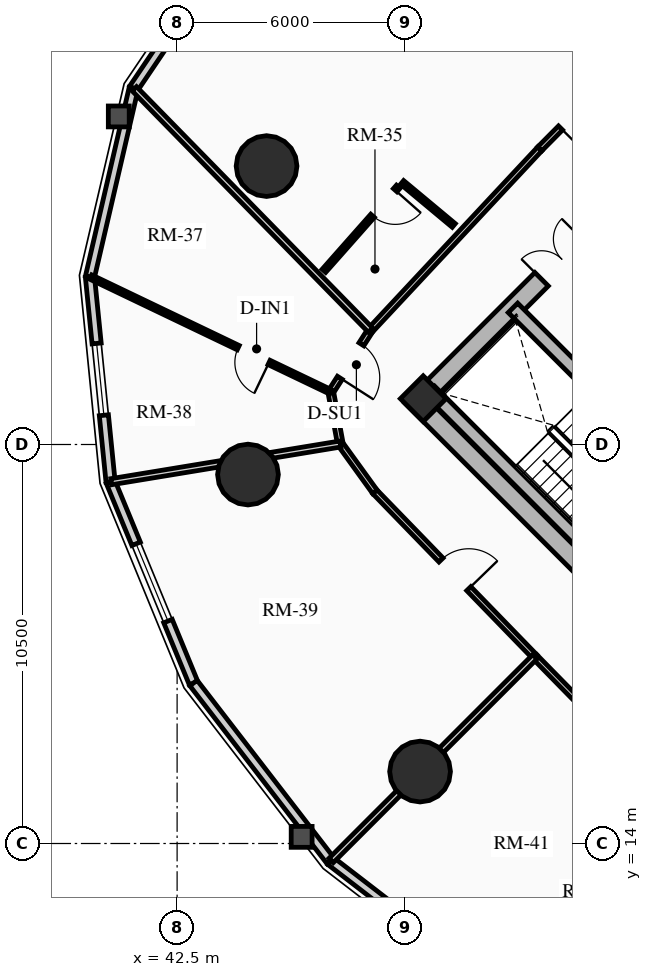
"""IFC4 building model, lengths in metres.
Left out: names, types, materials, properties, quantities, classifications, styles, units other than length and angle.
Written with IfcOpenShell. Run it as: python <this file> out.ifc"""

import sys

from ifc_helpers import new_model, si_unit, direction, frame, frame_2d, origin, origin_2d, place, context, subcontext, project, spatial, rectangle, circle, extrude, source, transform, mapped, element, fill, save


model = new_model("IFC4")
c1 = context("Model", 3, precision=1e-05, world=origin(), true_north=direction((0.0, 1.0)))
c2 = subcontext(c1, "Body", "Model", "MODEL_VIEW")
j1 = project(units=[si_unit("LENGTHUNIT", "METRE"), si_unit("PLANEANGLEUNIT", "RADIAN")], contexts=[c1])
p1 = place(None, origin())
s1 = spatial("IfcSite", under=j1, at=p1, CompositionType="ELEMENT")
p2 = place(p1, origin())
s2 = spatial("IfcBuilding", under=s1, at=p2, CompositionType="ELEMENT")
p3 = place(p2, frame((0.0, 0.0, 36.55)))
s3 = spatial("IfcBuildingStorey", under=s2, at=p3, CompositionType="ELEMENT", Elevation=36.55)
p4 = place(p3, frame((58.773, 15.661, 0.0), z_axis=(0.0, 0.0, 1.0), x_axis=(-0.707106781187, 0.707106781187, 0.0)))
e1 = element("IfcWall", 1, at=p4, inside=s3, PredefinedType="SHEAR", context=c2, shape_type="SweptSolid", body=[
    extrude(rectangle(XDim=14.3, YDim=0.5, at=frame_2d((7.15, 0.0))), origin(), (0.0, 0.0, 1.0), 2.91),
])
p5 = place(p3, frame((48.838, 25.596, 0.0), z_axis=(0.0, 0.0, 1.0), x_axis=(0.707106781187, 0.707106781187, 0.0)))
e2 = element("IfcWall", 2, at=p5, inside=s3, PredefinedType="SHEAR", context=c2, shape_type="SweptSolid", body=[
    extrude(rectangle(XDim=10.7, YDim=0.5, at=frame_2d((5.35, 0.0))), origin(), (0.0, 0.0, 1.0), 2.91),
])
m1 = source(origin(), c2, "Body", "SweptSolid", [
    extrude(rectangle(XDim=1.5, YDim=2.02, at=frame_2d((0.75, 1.01))), frame((0.0, 0.26, 0.0), z_axis=(0.0, -1.0, 0.0), x_axis=(1.0, 0.0, 0.0)), (0.0, 0.0, 1.0), 0.52),
])
p6 = place(p5, frame((4.6, 0.0, 0.0)))
e3 = element("IfcOpeningElement", 3, at=p6, cuts=e2, PredefinedType="OPENING", context=c2, shape_type="MappedRepresentation", body=[
    mapped(m1, transform((0.0, 0.0, 0.0), x_axis=(1.0, 0.0, 0.0), y_axis=(0.0, 1.0, 0.0), z_axis=(0.0, 0.0, 1.0), scale=1.0)),
])
p7 = place(p3, frame((61.096, 18.338, 0.0), z_axis=(0.0, 0.0, 1.0), x_axis=(-0.707106781187, 0.707106781187, 0.0)))
e4 = element("IfcWall", 4, at=p7, inside=s3, PredefinedType="SHEAR", context=c2, shape_type="SweptSolid", body=[
    extrude(rectangle(XDim=13.8, YDim=0.35, at=frame_2d((6.9, 0.0))), origin(), (0.0, 0.0, 1.0), 2.91),
])
m2 = source(origin(), c2, "Body", "SweptSolid", [
    extrude(rectangle(XDim=1.1, YDim=2.015, at=frame_2d((0.55, 1.007))), frame((0.0, 0.185, 0.0), z_axis=(0.0, -1.0, 0.0), x_axis=(1.0, 0.0, 0.0)), (0.0, 0.0, 1.0), 0.37),
])
p8 = place(p7, frame((4.9, 0.0, 0.0)))
e5 = element("IfcOpeningElement", 5, at=p8, cuts=e4, PredefinedType="OPENING", context=c2, shape_type="MappedRepresentation", body=[
    mapped(m2, transform((0.0, 0.0, 0.0), x_axis=(1.0, 0.0, 0.0), y_axis=(0.0, 1.0, 0.0), z_axis=(0.0, 0.0, 1.0), scale=1.0)),
])
m3 = source(origin(), c2, "Body", "SweptSolid", [
    extrude(rectangle(XDim=1.15, YDim=2.02, at=frame_2d((0.575, 1.01))), frame((0.0, 0.185, 0.0), z_axis=(0.0, -1.0, 0.0), x_axis=(1.0, 0.0, 0.0)), (0.0, 0.0, 1.0), 0.37),
])
p9 = place(p7, frame((7.32, 0.0, 0.0)))
e6 = element("IfcOpeningElement", 6, at=p9, cuts=e4, PredefinedType="OPENING", context=c2, shape_type="MappedRepresentation", body=[
    mapped(m3, transform((0.0, 0.0, 0.0), x_axis=(1.0, 0.0, 0.0), y_axis=(0.0, 1.0, 0.0), z_axis=(0.0, 0.0, 1.0), scale=1.0)),
])
p10 = place(p3, frame((53.922, 21.141, 0.0), z_axis=(0.0, 0.0, 1.0), x_axis=(-0.707106781187, 0.707106781187, 0.0)))
e7 = element("IfcWall", 7, at=p10, inside=s3, PredefinedType="SHEAR", context=c2, shape_type="SweptSolid", body=[
    extrude(rectangle(XDim=6.745, YDim=0.35, at=frame_2d((3.373, 0.0))), origin(), (0.0, 0.0, 1.0), 2.91),
])
p11 = place(p3, frame((48.976, 25.706, 0.0), z_axis=(0.0, 0.0, 1.0), x_axis=(0.707106781187, 0.707106781187, 0.0)))
e8 = element("IfcColumn", 8, at=p11, inside=s3, PredefinedType="COLUMN", context=c2, shape_type="SweptSolid", body=[
    extrude(rectangle(XDim=0.85, YDim=0.85, at=origin_2d()), origin(), (0.0, 0.0, 1.0), 2.91),
])
for number, where, z_axis, x_axis in (
    (9, (44.854, 31.827, 0.0), (0.0, 0.0, 1.0), (1.0, 0.0, 0.0)),
    (10, (44.365, 23.709, 0.0), (0.0, 0.0, 1.0), (1.0, 0.0, 0.0)),
    (11, (48.893, 15.893, 0.0), (0.0, 0.0, 1.0), (1.0, 0.0, 0.0)),
):
    element("IfcColumn", number, at=place(p3, frame(where, z_axis=z_axis, x_axis=x_axis)), inside=s3, PredefinedType="USERDEFINED", context=c2, shape_type="SweptSolid", body=[
        extrude(circle(Radius=0.8, at=origin_2d()), origin(), (0.0, 0.0, 1.0), 2.91),
    ])
p12 = place(p3, frame((41.356, 33.871, 0.0), z_axis=(0.0, 0.0, 1.0), x_axis=(0.559621532896, 0.828748297084, 0.0)))
e12 = element("IfcWall", 12, at=p12, inside=s3, PredefinedType="SOLIDWALL", context=c2, shape_type="SweptSolid", body=[
    extrude(rectangle(XDim=4.879, YDim=0.24, at=frame_2d((2.439, 0.0))), origin(), (0.0, 0.0, 1.0), 2.073),
])
m4 = source(origin(), c2, "Body", "SweptSolid", [
    extrude(rectangle(XDim=2.2, YDim=1.35, at=frame_2d((1.1, 0.675))), frame((0.0, 0.13, 0.0), z_axis=(0.0, -1.0, 0.0), x_axis=(1.0, 0.0, 0.0)), (0.0, 0.0, 1.0), 0.26),
])
p13 = place(p12, frame((1.339, 0.0, 0.65)))
e13 = element("IfcOpeningElement", 13, at=p13, cuts=e12, PredefinedType="OPENING", context=c2, shape_type="MappedRepresentation", body=[
    mapped(m4, transform((0.0, 0.0, 0.0), x_axis=(1.0, 0.0, 0.0), y_axis=(0.0, 1.0, 0.0), z_axis=(0.0, 0.0, 1.0), scale=1.0)),
])
p14 = place(p3, frame((40.206, 28.91, 0.0), z_axis=(0.0, 0.0, 1.0), x_axis=(0.22582585901, 0.974167686491, 0.0)))
e14 = element("IfcWall", 14, at=p14, inside=s3, PredefinedType="SOLIDWALL", context=c2, shape_type="SweptSolid", body=[
    extrude(rectangle(XDim=5.092, YDim=0.24, at=frame_2d((2.546, 0.0))), origin(), (0.0, 0.0, 1.0), 2.073),
])
p15 = place(p3, frame((40.749, 23.518, 0.0), z_axis=(0.0, 0.0, 1.0), x_axis=(-0.100190592135, 0.994968263437, 0.0)))
e15 = element("IfcWall", 15, at=p15, inside=s3, PredefinedType="SOLIDWALL", context=c2, shape_type="SweptSolid", body=[
    extrude(rectangle(XDim=5.419, YDim=0.24, at=frame_2d((2.71, 0.0))), origin(), (0.0, 0.0, 1.0), 2.073),
])
m5 = source(origin(), c2, "Body", "SweptSolid", [
    extrude(rectangle(XDim=1.9, YDim=1.35, at=frame_2d((0.95, 0.675))), frame((0.0, 0.13, 0.0), z_axis=(0.0, -1.0, 0.0), x_axis=(1.0, 0.0, 0.0)), (0.0, 0.0, 1.0), 0.26),
])
p16 = place(p15, frame((1.76, 0.0, 0.65)))
e16 = element("IfcOpeningElement", 16, at=p16, cuts=e15, PredefinedType="OPENING", context=c2, shape_type="MappedRepresentation", body=[
    mapped(m5, transform((0.0, 0.0, 0.0), x_axis=(1.0, 0.0, 0.0), y_axis=(0.0, 1.0, 0.0), z_axis=(0.0, 0.0, 1.0), scale=1.0)),
])
p17 = place(p3, frame((42.932, 18.222, 0.0), z_axis=(0.0, 0.0, 1.0), x_axis=(-0.381077764176, 0.924542988536, 0.0)))
e17 = element("IfcWall", 17, at=p17, inside=s3, PredefinedType="SOLIDWALL", context=c2, shape_type="SweptSolid", body=[
    extrude(rectangle(XDim=5.728, YDim=0.24, at=frame_2d((2.864, 0.0))), origin(), (0.0, 0.0, 1.0), 2.073),
])
p18 = place(p17, frame((1.764, 0.0, 0.65)))
e18 = element("IfcOpeningElement", 18, at=p18, cuts=e17, PredefinedType="OPENING", context=c2, shape_type="MappedRepresentation", body=[
    mapped(m4, transform((0.0, 0.0, 0.0), x_axis=(1.0, 0.0, 0.0), y_axis=(0.0, 1.0, 0.0), z_axis=(0.0, 0.0, 1.0), scale=1.0)),
])
p19 = place(p3, frame((46.541, 13.541, 0.0), z_axis=(0.0, 0.0, 1.0), x_axis=(-0.610494906082, 0.792020182601, 0.0)))
e19 = element("IfcWall", 19, at=p19, inside=s3, PredefinedType="SOLIDWALL", context=c2, shape_type="SweptSolid", body=[
    extrude(rectangle(XDim=5.911, YDim=0.24, at=frame_2d((2.956, 0.0))), origin(), (0.0, 0.0, 1.0), 2.073),
])
p20 = place(p3, frame((51.222, 9.932, 0.0), z_axis=(0.0, 0.0, 1.0), x_axis=(-0.792020182601, 0.610494906082, 0.0)))
e20 = element("IfcWall", 20, at=p20, inside=s3, PredefinedType="SOLIDWALL", context=c2, shape_type="SweptSolid", body=[
    extrude(rectangle(XDim=5.911, YDim=0.24, at=frame_2d((2.956, 0.0))), origin(), (0.0, 0.0, 1.0), 2.073),
])
p21 = place(p20, frame((2.005, 0.0, 0.65)))
e21 = element("IfcOpeningElement", 21, at=p21, cuts=e20, PredefinedType="OPENING", context=c2, shape_type="MappedRepresentation", body=[
    mapped(m5, transform((0.0, 0.0, 0.0), x_axis=(1.0, 0.0, 0.0), y_axis=(0.0, 1.0, 0.0), z_axis=(0.0, 0.0, 1.0), scale=1.0)),
])
p22 = place(p3, frame((54.427, 34.683, 0.0), z_axis=(0.0, 0.0, 1.0), x_axis=(-0.704178989986, -0.710022499687, 0.0)))
e22 = element("IfcWall", 22, at=p22, inside=s3, PredefinedType="PARTITIONING", context=c2, shape_type="SweptSolid", body=[
    extrude(rectangle(XDim=3.384, YDim=0.15, at=frame_2d((1.692, 0.0))), origin(), (0.0, 0.0, 1.0), 2.159),
])
m6 = source(origin(), c2, "Body", "SweptSolid", [
    extrude(rectangle(XDim=1.05, YDim=2.015, at=frame_2d((0.525, 1.007))), frame((0.0, 0.085, 0.0), z_axis=(0.0, -1.0, 0.0), x_axis=(1.0, 0.0, 0.0)), (0.0, 0.0, 1.0), 0.17),
])
p23 = place(p22, frame((1.56, 0.0, 0.0)))
e23 = element("IfcOpeningElement", 23, at=p23, cuts=e22, PredefinedType="OPENING", context=c2, shape_type="MappedRepresentation", body=[
    mapped(m6, transform((0.0, 0.0, 0.0), x_axis=(1.0, 0.0, 0.0), y_axis=(0.0, 1.0, 0.0), z_axis=(0.0, 0.0, 1.0), scale=1.0)),
])
p24 = place(p3, frame((52.043, 32.28, 0.0), z_axis=(0.0, 0.0, 1.0), x_axis=(-0.682606081633, -0.730786519661, 0.0)))
e24 = element("IfcWall", 24, at=p24, inside=s3, PredefinedType="PARTITIONING", context=c2, shape_type="SweptSolid", body=[
    extrude(rectangle(XDim=6.527, YDim=0.15, at=frame_2d((3.263, 0.0))), origin(), (0.0, 0.0, 1.0), 2.159),
])
p25 = place(p3, frame((47.588, 27.51, 0.0), z_axis=(0.0, 0.0, 1.0), x_axis=(-0.540202619347, -0.841534984449, 0.0)))
e25 = element("IfcWall", 25, at=p25, inside=s3, PredefinedType="PARTITIONING", context=c2, shape_type="SweptSolid", body=[
    extrude(rectangle(XDim=1.935, YDim=0.15, at=frame_2d((0.967, 0.0))), origin(), (0.0, 0.0, 1.0), 2.159),
])
p26 = place(p25, frame((0.442, 0.0, 0.0)))
e26 = element("IfcOpeningElement", 26, at=p26, cuts=e25, PredefinedType="OPENING", context=c2, shape_type="MappedRepresentation", body=[
    mapped(m6, transform((0.0, 0.0, 0.0), x_axis=(1.0, 0.0, 0.0), y_axis=(0.0, 1.0, 0.0), z_axis=(0.0, 0.0, 1.0), scale=1.0)),
])
p27 = place(p3, frame((46.543, 25.882, 0.0), z_axis=(0.0, 0.0, 1.0), x_axis=(0.181153502579, -0.983454832976, 0.0)))
e27 = element("IfcWall", 27, at=p27, inside=s3, PredefinedType="PARTITIONING", context=c2, shape_type="SweptSolid", body=[
    extrude(rectangle(XDim=1.392, YDim=0.15, at=frame_2d((0.696, 0.0))), origin(), (0.0, 0.0, 1.0), 2.159),
])
p28 = place(p3, frame((46.795, 24.513, 0.0), z_axis=(0.0, 0.0, 1.0), x_axis=(0.585628197524, -0.810579801294, 0.0)))
e28 = element("IfcWall", 28, at=p28, inside=s3, PredefinedType="PARTITIONING", context=c2, shape_type="SweptSolid", body=[
    extrude(rectangle(XDim=1.554, YDim=0.15, at=frame_2d((0.777, 0.0))), origin(), (0.0, 0.0, 1.0), 2.205),
])
p29 = place(p3, frame((47.706, 23.253, 0.0), z_axis=(0.0, 0.0, 1.0), x_axis=(0.696179266346, -0.717867974707, 0.0)))
e29 = element("IfcWall", 29, at=p29, inside=s3, PredefinedType="PARTITIONING", context=c2, shape_type="SweptSolid", body=[
    extrude(rectangle(XDim=6.045, YDim=0.15, at=frame_2d((3.022, 0.0))), origin(), (0.0, 0.0, 1.0), 2.635),
])
p30 = place(p29, frame((2.497, 0.0, 0.0)))
e30 = element("IfcOpeningElement", 30, at=p30, cuts=e29, PredefinedType="OPENING", context=c2, shape_type="MappedRepresentation", body=[
    mapped(m6, transform((0.0, 0.0, 0.0), x_axis=(1.0, 0.0, 0.0), y_axis=(0.0, 1.0, 0.0), z_axis=(0.0, 0.0, 1.0), scale=1.0)),
])
p31 = place(p3, frame((51.914, 18.914, 0.0), z_axis=(0.0, 0.0, 1.0), x_axis=(0.699999313799, -0.714143515465, 0.0)))
e31 = element("IfcWall", 31, at=p31, inside=s3, PredefinedType="PARTITIONING", context=c2, shape_type="SweptSolid", body=[
    extrude(rectangle(XDim=6.162, YDim=0.15, at=frame_2d((3.081, 0.0))), origin(), (0.0, 0.0, 1.0), 2.159),
])
p32 = place(p31, frame((2.556, 0.0, 0.0)))
e32 = element("IfcOpeningElement", 32, at=p32, cuts=e31, PredefinedType="OPENING", context=c2, shape_type="MappedRepresentation", body=[
    mapped(m6, transform((0.0, 0.0, 0.0), x_axis=(1.0, 0.0, 0.0), y_axis=(0.0, 1.0, 0.0), z_axis=(0.0, 0.0, 1.0), scale=1.0)),
])
p33 = place(p3, frame((54.427, 34.683, 0.0), z_axis=(0.0, 0.0, 1.0), x_axis=(-0.726732956694, 0.686920089716, 0.0)))
e33 = element("IfcWall", 33, at=p33, inside=s3, PredefinedType="PARTITIONING", context=c2, shape_type="SweptSolid", body=[
    extrude(rectangle(XDim=8.653, YDim=0.16, at=frame_2d((4.326, 0.0))), origin(), (0.0, 0.0, 1.0), 2.073),
])
p34 = place(p3, frame((47.588, 27.51, 0.0), z_axis=(0.0, 0.0, 1.0), x_axis=(-0.699371977892, 0.714757886657, 0.0)))
e34 = element("IfcWall", 34, at=p34, inside=s3, PredefinedType="PARTITIONING", context=c2, shape_type="SweptSolid", body=[
    extrude(rectangle(XDim=8.886, YDim=0.16, at=frame_2d((4.443, 0.0))), origin(), (0.0, 0.0, 1.0), 2.073),
])
p35 = place(p3, frame((46.795, 24.513, 0.0), z_axis=(0.0, 0.0, 1.0), x_axis=(-0.986729986004, -0.162369746937, 0.0)))
e35 = element("IfcWall", 35, at=p35, inside=s3, PredefinedType="PARTITIONING", context=c2, shape_type="SweptSolid", body=[
    extrude(rectangle(XDim=6.108, YDim=0.16, at=frame_2d((3.054, 0.0))), origin(), (0.0, 0.0, 1.0), 2.073),
])
p36 = place(p3, frame((51.914, 18.914, 0.0), z_axis=(0.0, 0.0, 1.0), x_axis=(-0.707106781187, -0.707106781187, 0.0)))
e36 = element("IfcWall", 36, at=p36, inside=s3, PredefinedType="PARTITIONING", context=c2, shape_type="SweptSolid", body=[
    extrude(rectangle(XDim=7.579, YDim=0.16, at=frame_2d((3.79, 0.0))), origin(), (0.0, 0.0, 1.0), 2.073),
])
p37 = place(p3, frame((49.78, 30.264, 0.0), z_axis=(0.0, 0.0, 1.0), x_axis=(-0.768209972595, 0.640197967824, 0.0)))
e37 = element("IfcWall", 37, at=p37, inside=s3, PredefinedType="PARTITIONING", context=c2, shape_type="SweptSolid", body=[
    extrude(rectangle(XDim=1.77, YDim=0.125, at=frame_2d((0.885, 0.0))), origin(), (0.0, 0.0, 1.0), 2.635),
])
p38 = place(p3, frame((48.318, 31.282, 0.0), z_axis=(0.0, 0.0, 1.0), x_axis=(-0.662365127428, -0.749181178333, 0.0)))
e38 = element("IfcWall", 38, at=p38, inside=s3, PredefinedType="PARTITIONING", context=c2, shape_type="SweptSolid", body=[
    extrude(rectangle(XDim=2.953, YDim=0.125, at=frame_2d((1.477, 0.0))), origin(), (0.0, 0.0, 1.0), 2.159),
])
m7 = source(origin(), c2, "Body", "SweptSolid", [
    extrude(rectangle(XDim=0.9, YDim=2.005, at=frame_2d((0.45, 1.002))), frame((0.0, 0.073, 0.0), z_axis=(0.0, -1.0, 0.0), x_axis=(1.0, 0.0, 0.0)), (0.0, 0.0, 1.0), 0.145),
])
p39 = place(p38, frame((0.12, 0.0, 0.0)))
e39 = element("IfcOpeningElement", 39, at=p39, cuts=e38, PredefinedType="OPENING", context=c2, shape_type="MappedRepresentation", body=[
    mapped(m7, transform((0.0, 0.0, 0.0), x_axis=(1.0, 0.0, 0.0), y_axis=(0.0, 1.0, 0.0), z_axis=(0.0, 0.0, 1.0), scale=1.0)),
])
p40 = place(p3, frame((46.543, 25.882, 0.0), z_axis=(0.0, 0.0, 1.0), x_axis=(-0.901937110034, 0.431867398103, 0.0)))
e40 = element("IfcWall", 40, at=p40, inside=s3, PredefinedType="PARTITIONING", context=c2, shape_type="SweptSolid", body=[
    extrude(rectangle(XDim=7.004, YDim=0.125, at=frame_2d((3.502, 0.0))), origin(), (0.0, 0.0, 1.0), 2.073),
])
p41 = place(p40, frame((1.8, 0.0, 0.0)))
e41 = element("IfcOpeningElement", 41, at=p41, cuts=e40, PredefinedType="OPENING", context=c2, shape_type="MappedRepresentation", body=[
    mapped(m7, transform((0.0, 0.0, 0.0), x_axis=(1.0, 0.0, 0.0), y_axis=(0.0, 1.0, 0.0), z_axis=(0.0, 0.0, 1.0), scale=1.0)),
])
m8 = source(origin(), c2, "Body", "SweptSolid", [
    extrude(rectangle(XDim=1.9, YDim=1.35, at=frame_2d((0.95, 0.675))), frame((0.0, 0.03, 0.0), z_axis=(0.0, -1.0, 0.0), x_axis=(1.0, 0.0, 0.0)), (0.0, 0.0, 1.0), 0.06),
])
p42 = place(p16, origin())
e42 = element("IfcWindow", 42, at=p42, inside=s3, PartitioningType="DOUBLE_PANEL_VERTICAL", PredefinedType="WINDOW", context=c2, shape_type="MappedRepresentation", body=[
    mapped(m8, transform((0.0, 0.0, 0.0), x_axis=(1.0, 0.0, 0.0), y_axis=(0.0, 1.0, 0.0), z_axis=(0.0, 0.0, 1.0), scale=1.0)),
])
fill(e16, e42)
m9 = source(origin(), c2, "Body", "SweptSolid", [
    extrude(rectangle(XDim=2.2, YDim=1.35, at=frame_2d((1.1, 0.675))), frame((0.0, 0.03, 0.0), z_axis=(0.0, -1.0, 0.0), x_axis=(1.0, 0.0, 0.0)), (0.0, 0.0, 1.0), 0.06),
])
p43 = place(p18, origin())
e43 = element("IfcWindow", 43, at=p43, inside=s3, PartitioningType="DOUBLE_PANEL_VERTICAL", PredefinedType="WINDOW", context=c2, shape_type="MappedRepresentation", body=[
    mapped(m9, transform((0.0, 0.0, 0.0), x_axis=(1.0, 0.0, 0.0), y_axis=(0.0, 1.0, 0.0), z_axis=(0.0, 0.0, 1.0), scale=1.0)),
])
fill(e18, e43)
m10 = source(origin(), c2, "Body", "SweptSolid", [
    extrude(rectangle(XDim=1.5, YDim=2.02, at=frame_2d((0.75, 1.01))), frame((0.0, 0.025, 0.0), z_axis=(0.0, -1.0, 0.0), x_axis=(1.0, 0.0, 0.0)), (0.0, 0.0, 1.0), 0.05),
])
p44 = place(p6, origin())
e44 = element("IfcDoor", 44, at=p44, inside=s3, OperationType="DOUBLE_DOOR_SINGLE_SWING", PredefinedType="DOOR", context=c2, shape_type="MappedRepresentation", body=[
    mapped(m10, transform((0.0, 0.0, 0.0), x_axis=(1.0, 0.0, 0.0), y_axis=(0.0, 1.0, 0.0), z_axis=(0.0, 0.0, 1.0), scale=1.0)),
])
fill(e3, e44)
m11 = source(origin(), c2, "Body", "SweptSolid", [
    extrude(rectangle(XDim=1.05, YDim=2.015, at=frame_2d((0.525, 1.007))), frame((0.0, 0.025, 0.0), z_axis=(0.0, -1.0, 0.0), x_axis=(1.0, 0.0, 0.0)), (0.0, 0.0, 1.0), 0.05),
])
p45 = place(p23, origin())
e45 = element("IfcDoor", 45, at=p45, inside=s3, OperationType="SINGLE_SWING_RIGHT", PredefinedType="DOOR", context=c2, shape_type="MappedRepresentation", body=[
    mapped(m11, transform((0.0, 0.0, 0.0), x_axis=(1.0, 0.0, 0.0), y_axis=(0.0, 1.0, 0.0), z_axis=(0.0, 0.0, 1.0), scale=1.0)),
])
fill(e23, e45)
m12 = source(origin(), c2, "Body", "SweptSolid", [
    extrude(rectangle(XDim=0.9, YDim=2.005, at=frame_2d((0.45, 1.002))), frame((0.0, 0.025, 0.0), z_axis=(0.0, -1.0, 0.0), x_axis=(1.0, 0.0, 0.0)), (0.0, 0.0, 1.0), 0.05),
])
p46 = place(p39, origin())
e46 = element("IfcDoor", 46, at=p46, inside=s3, OperationType="SINGLE_SWING_LEFT", PredefinedType="DOOR", context=c2, shape_type="MappedRepresentation", body=[
    mapped(m12, transform((0.0, 0.0, 0.0), x_axis=(1.0, 0.0, 0.0), y_axis=(0.0, 1.0, 0.0), z_axis=(0.0, 0.0, 1.0), scale=1.0)),
])
fill(e39, e46)
p47 = place(p26, origin())
e47 = element("IfcDoor", 47, at=p47, inside=s3, OperationType="SINGLE_SWING_RIGHT", PredefinedType="DOOR", context=c2, shape_type="MappedRepresentation", body=[
    mapped(m11, transform((0.0, 0.0, 0.0), x_axis=(1.0, 0.0, 0.0), y_axis=(0.0, 1.0, 0.0), z_axis=(0.0, 0.0, 1.0), scale=1.0)),
])
fill(e26, e47)
p48 = place(p41, origin())
e48 = element("IfcDoor", 48, at=p48, inside=s3, OperationType="SINGLE_SWING_LEFT", PredefinedType="DOOR", context=c2, shape_type="MappedRepresentation", body=[
    mapped(m12, transform((0.0, 0.0, 0.0), x_axis=(1.0, 0.0, 0.0), y_axis=(0.0, 1.0, 0.0), z_axis=(0.0, 0.0, 1.0), scale=1.0)),
])
fill(e41, e48)
p49 = place(p30, origin())
e49 = element("IfcDoor", 49, at=p49, inside=s3, OperationType="SINGLE_SWING_RIGHT", PredefinedType="DOOR", context=c2, shape_type="MappedRepresentation", body=[
    mapped(m11, transform((0.0, 0.0, 0.0), x_axis=(1.0, 0.0, 0.0), y_axis=(0.0, 1.0, 0.0), z_axis=(0.0, 0.0, 1.0), scale=1.0)),
])
fill(e30, e49)
save(model, sys.argv[1])
